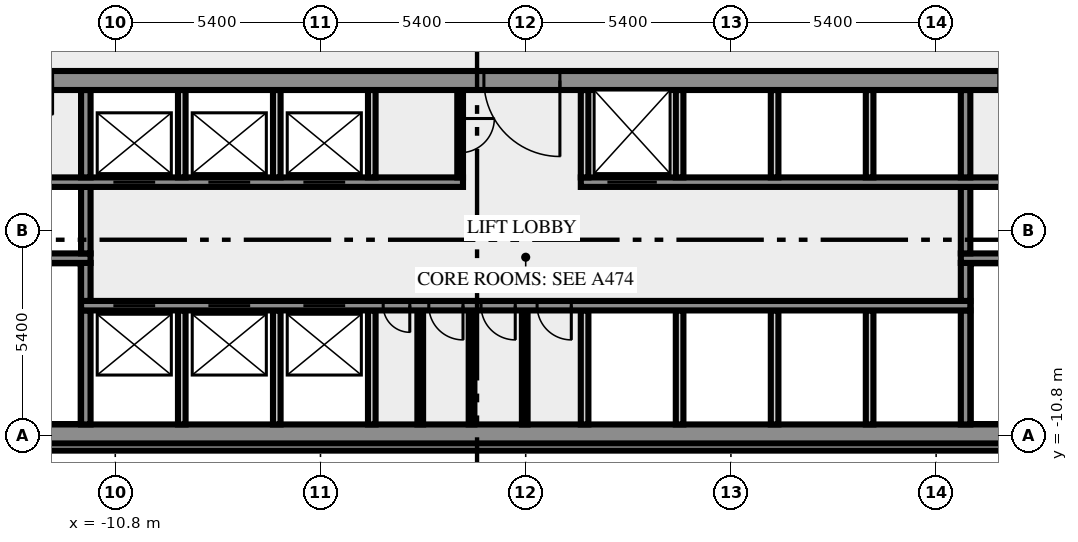
"""IFC4 building model, lengths in metres.
Left out: names, types, materials, properties, quantities, classifications, styles, units other than length and angle.
Written with IfcOpenShell. Run it as: python <this file> out.ifc"""

import sys

from ifc_helpers import new_model, si_unit, direction, frame, frame_2d, origin, place, context, subcontext, project, spatial, rectangle, extrude, element, fill, save


model = new_model("IFC4")
c1 = context("Model", 3, precision=1e-05, world=origin(), true_north=direction((0.0, 1.0)))
c2 = subcontext(c1, "Body", "Model", "MODEL_VIEW")
j1 = project(units=[si_unit("LENGTHUNIT", "METRE"), si_unit("PLANEANGLEUNIT", "RADIAN")], contexts=[c1])
p1 = place(None, origin())
s1 = spatial("IfcSite", under=j1, at=p1, CompositionType="ELEMENT")
p2 = place(p1, origin())
s2 = spatial("IfcBuilding", under=s1, at=p2, CompositionType="ELEMENT")
p3 = place(p2, frame((0.0, 0.0, 125.0)))
s3 = spatial("IfcBuildingStorey", under=s2, at=p3, CompositionType="ELEMENT", Elevation=125.0)
p4 = place(p3, frame((-17.444, -11.088, 0.0), z_axis=(0.0, 0.0, 1.0), x_axis=(1.0, 0.0, 0.0)))
e1 = element("IfcWall", 1, at=p4, inside=s3, PredefinedType="SOLIDWALL", context=c2, shape_type="SweptSolid", body=[
    extrude(rectangle(XDim=34.888, YDim=0.2, at=frame_2d((17.444, 0.0))), origin(), (0.0, 0.0, 1.0), 3.65),
])
p5 = place(p3, frame((-20.0, -10.75, 0.0), z_axis=(0.0, 0.0, 1.0), x_axis=(1.0, 0.0, 0.0)))
e2 = element("IfcWall", 2, at=p5, inside=s3, PredefinedType="SHEAR", context=c2, shape_type="SweptSolid", body=[
    extrude(rectangle(XDim=40.0, YDim=0.5, at=frame_2d((20.0, 0.0))), origin(), (0.0, 0.0, 1.0), 3.65),
])
p6 = place(p5, frame((0.8, 0.0, 1.0)))
e3 = element("IfcOpeningElement", 3, at=p6, cuts=e2, PredefinedType="OPENING", context=c2, shape_type="SweptSolid", body=[
    extrude(rectangle(XDim=1.2, YDim=1.2, at=frame_2d((0.6, 0.6))), frame((0.0, 0.26, 0.0), z_axis=(0.0, -1.0, 0.0), x_axis=(1.0, 0.0, 0.0)), (0.0, 0.0, 1.0), 0.52),
])
p7 = place(p5, frame((38.0, 0.0, 1.0)))
e4 = element("IfcOpeningElement", 4, at=p7, cuts=e2, PredefinedType="OPENING", context=c2, shape_type="SweptSolid", body=[
    extrude(rectangle(XDim=1.2, YDim=1.2, at=frame_2d((0.6, 0.6))), frame((0.0, 0.26, 0.0), z_axis=(0.0, -1.0, 0.0), x_axis=(1.0, 0.0, 0.0)), (0.0, 0.0, 1.0), 0.52),
])
p8 = place(p3, frame((-11.575, -10.5, 0.0), z_axis=(0.0, 0.0, 1.0), x_axis=(0.0, 1.0, 0.0)))
e5 = element("IfcWall", 5, at=p8, inside=s3, PredefinedType="SHEAR", context=c2, shape_type="SweptSolid", body=[
    extrude(rectangle(XDim=3.0, YDim=0.25, at=frame_2d((1.5, 0.0))), origin(), (0.0, 0.0, 1.0), 3.65),
])
for number, where, z_axis, x_axis in (
    (6, (-9.05, -10.5, 0.0), (0.0, 0.0, 1.0), (0.0, 1.0, 0.0)),
    (7, (-6.55, -10.5, 0.0), (0.0, 0.0, 1.0), (0.0, 1.0, 0.0)),
    (8, (-4.05, -10.5, 0.0), (0.0, 0.0, 1.0), (0.0, 1.0, 0.0)),
):
    element("IfcWall", number, at=place(p3, frame(where, z_axis=z_axis, x_axis=x_axis)), inside=s3, PredefinedType="SOLIDWALL", context=c2, shape_type="SweptSolid", body=[
        extrude(rectangle(XDim=3.0, YDim=0.2, at=frame_2d((1.5, 0.0))), origin(), (0.0, 0.0, 1.0), 3.65),
    ])
for number, where, z_axis, x_axis in (
    (9, (-2.775, -10.5, 0.0), (0.0, 0.0, 1.0), (0.0, 1.0, 0.0)),
    (10, (-1.425, -10.5, 0.0), (0.0, 0.0, 1.0), (0.0, 1.0, 0.0)),
    (11, (-0.025, -10.5, 0.0), (0.0, 0.0, 1.0), (0.0, 1.0, 0.0)),
):
    element("IfcWall", number, at=place(p3, frame(where, z_axis=z_axis, x_axis=x_axis)), inside=s3, PredefinedType="PARTITIONING", context=c2, shape_type="SweptSolid", body=[
        extrude(rectangle(XDim=3.0, YDim=0.15, at=frame_2d((1.5, 0.0))), origin(), (0.0, 0.0, 1.0), 3.65),
    ])
for number, where, z_axis, x_axis in (
    (12, (1.55, -10.5, 0.0), (0.0, 0.0, 1.0), (0.0, 1.0, 0.0)),
    (13, (4.05, -10.5, 0.0), (0.0, 0.0, 1.0), (0.0, 1.0, 0.0)),
    (14, (6.55, -10.5, 0.0), (0.0, 0.0, 1.0), (0.0, 1.0, 0.0)),
    (15, (9.05, -10.5, 0.0), (0.0, 0.0, 1.0), (0.0, 1.0, 0.0)),
):
    element("IfcWall", number, at=place(p3, frame(where, z_axis=z_axis, x_axis=x_axis)), inside=s3, PredefinedType="SOLIDWALL", context=c2, shape_type="SweptSolid", body=[
        extrude(rectangle(XDim=3.0, YDim=0.2, at=frame_2d((1.5, 0.0))), origin(), (0.0, 0.0, 1.0), 3.65),
    ])
p9 = place(p3, frame((11.575, -10.5, 0.0), z_axis=(0.0, 0.0, 1.0), x_axis=(0.0, 1.0, 0.0)))
e16 = element("IfcWall", 16, at=p9, inside=s3, PredefinedType="SHEAR", context=c2, shape_type="SweptSolid", body=[
    extrude(rectangle(XDim=3.0, YDim=0.25, at=frame_2d((1.5, 0.0))), origin(), (0.0, 0.0, 1.0), 3.65),
])
p10 = place(p3, frame((11.7, -7.375, 0.0), z_axis=(0.0, 0.0, 1.0), x_axis=(-1.0, 0.0, 0.0)))
e17 = element("IfcWall", 17, at=p10, inside=s3, PredefinedType="SHEAR", context=c2, shape_type="SweptSolid", body=[
    extrude(rectangle(XDim=23.4, YDim=0.25, at=frame_2d((11.7, 0.0))), origin(), (0.0, 0.0, 1.0), 3.65),
])
p11 = place(p10, frame((21.45, 0.0, 0.0)))
e18 = element("IfcOpeningElement", 18, at=p11, cuts=e17, PredefinedType="OPENING", context=c2, shape_type="SweptSolid", body=[
    extrude(rectangle(XDim=1.1, YDim=2.1, at=frame_2d((0.55, 1.05))), frame((0.0, 0.135, 0.0), z_axis=(0.0, -1.0, 0.0), x_axis=(1.0, 0.0, 0.0)), (0.0, 0.0, 1.0), 0.27),
])
p12 = place(p10, frame((18.95, 0.0, 0.0)))
e19 = element("IfcOpeningElement", 19, at=p12, cuts=e17, PredefinedType="OPENING", context=c2, shape_type="SweptSolid", body=[
    extrude(rectangle(XDim=1.1, YDim=2.1, at=frame_2d((0.55, 1.05))), frame((0.0, 0.135, 0.0), z_axis=(0.0, -1.0, 0.0), x_axis=(1.0, 0.0, 0.0)), (0.0, 0.0, 1.0), 0.27),
])
p13 = place(p10, frame((16.45, 0.0, 0.0)))
e20 = element("IfcOpeningElement", 20, at=p13, cuts=e17, PredefinedType="OPENING", context=c2, shape_type="SweptSolid", body=[
    extrude(rectangle(XDim=1.1, YDim=2.1, at=frame_2d((0.55, 1.05))), frame((0.0, 0.135, 0.0), z_axis=(0.0, -1.0, 0.0), x_axis=(1.0, 0.0, 0.0)), (0.0, 0.0, 1.0), 0.27),
])
p14 = place(p10, frame((14.75, 0.0, 0.0)))
e21 = element("IfcOpeningElement", 21, at=p14, cuts=e17, PredefinedType="OPENING", context=c2, shape_type="SweptSolid", body=[
    extrude(rectangle(XDim=0.7, YDim=2.1, at=frame_2d((0.35, 1.05))), frame((0.0, 0.135, 0.0), z_axis=(0.0, -1.0, 0.0), x_axis=(1.0, 0.0, 0.0)), (0.0, 0.0, 1.0), 0.27),
])
p15 = place(p10, frame((13.35, 0.0, 0.0)))
e22 = element("IfcOpeningElement", 22, at=p15, cuts=e17, PredefinedType="OPENING", context=c2, shape_type="SweptSolid", body=[
    extrude(rectangle(XDim=0.9, YDim=2.1, at=frame_2d((0.45, 1.05))), frame((0.0, 0.135, 0.0), z_axis=(0.0, -1.0, 0.0), x_axis=(1.0, 0.0, 0.0)), (0.0, 0.0, 1.0), 0.27),
])
p16 = place(p10, frame((11.975, 0.0, 0.0)))
e23 = element("IfcOpeningElement", 23, at=p16, cuts=e17, PredefinedType="OPENING", context=c2, shape_type="SweptSolid", body=[
    extrude(rectangle(XDim=0.9, YDim=2.1, at=frame_2d((0.45, 1.05))), frame((0.0, 0.135, 0.0), z_axis=(0.0, -1.0, 0.0), x_axis=(1.0, 0.0, 0.0)), (0.0, 0.0, 1.0), 0.27),
])
p17 = place(p10, frame((10.5, 0.0, 0.0)))
e24 = element("IfcOpeningElement", 24, at=p17, cuts=e17, PredefinedType="OPENING", context=c2, shape_type="SweptSolid", body=[
    extrude(rectangle(XDim=0.9, YDim=2.1, at=frame_2d((0.45, 1.05))), frame((0.0, 0.135, 0.0), z_axis=(0.0, -1.0, 0.0), x_axis=(1.0, 0.0, 0.0)), (0.0, 0.0, 1.0), 0.27),
])
for number, where, z_axis, x_axis in (
    (25, (-11.575, -7.25, 0.0), (0.0, 0.0, 1.0), (0.0, 1.0, 0.0)),
    (26, (11.575, -7.25, 0.0), (0.0, 0.0, 1.0), (0.0, 1.0, 0.0)),
):
    element("IfcWall", number, at=place(p3, frame(where, z_axis=z_axis, x_axis=x_axis)), inside=s3, PredefinedType="SHEAR", context=c2, shape_type="SweptSolid", body=[
        extrude(rectangle(XDim=1.0, YDim=0.25, at=frame_2d((0.5, 0.0))), origin(), (0.0, 0.0, 1.0), 3.65),
    ])
p18 = place(p3, frame((-11.45, -6.125, 0.0), z_axis=(0.0, 0.0, 1.0), x_axis=(-1.0, 0.0, 0.0)))
e27 = element("IfcWall", 27, at=p18, inside=s3, PredefinedType="SHEAR", context=c2, shape_type="SweptSolid", body=[
    extrude(rectangle(XDim=8.05, YDim=0.25, at=frame_2d((4.025, 0.0))), origin(), (0.0, 0.0, 1.0), 3.65),
])
p19 = place(p18, frame((6.2, 0.0, 0.0)))
e28 = element("IfcOpeningElement", 28, at=p19, cuts=e27, PredefinedType="OPENING", context=c2, shape_type="SweptSolid", body=[
    extrude(rectangle(XDim=1.8, YDim=2.1, at=frame_2d((0.9, 1.05))), frame((0.0, 0.135, 0.0), z_axis=(0.0, -1.0, 0.0), x_axis=(1.0, 0.0, 0.0)), (0.0, 0.0, 1.0), 0.27),
])
p20 = place(p3, frame((19.5, -6.125, 0.0), z_axis=(0.0, 0.0, 1.0), x_axis=(-1.0, 0.0, 0.0)))
e29 = element("IfcWall", 29, at=p20, inside=s3, PredefinedType="SHEAR", context=c2, shape_type="SweptSolid", body=[
    extrude(rectangle(XDim=8.05, YDim=0.25, at=frame_2d((4.025, 0.0))), origin(), (0.0, 0.0, 1.0), 3.65),
])
p21 = place(p20, frame((0.05, 0.0, 0.0)))
e30 = element("IfcOpeningElement", 30, at=p21, cuts=e29, PredefinedType="OPENING", context=c2, shape_type="SweptSolid", body=[
    extrude(rectangle(XDim=1.8, YDim=2.1, at=frame_2d((0.9, 1.05))), frame((0.0, 0.135, 0.0), z_axis=(0.0, -1.0, 0.0), x_axis=(1.0, 0.0, 0.0)), (0.0, 0.0, 1.0), 0.27),
])
for number, where, z_axis, x_axis in (
    (31, (-11.575, -6.0, 0.0), (0.0, 0.0, 1.0), (0.0, 1.0, 0.0)),
    (32, (11.575, -6.0, 0.0), (0.0, 0.0, 1.0), (0.0, 1.0, 0.0)),
):
    element("IfcWall", number, at=place(p3, frame(where, z_axis=z_axis, x_axis=x_axis)), inside=s3, PredefinedType="SHEAR", context=c2, shape_type="SweptSolid", body=[
        extrude(rectangle(XDim=1.75, YDim=0.25, at=frame_2d((0.875, 0.0))), origin(), (0.0, 0.0, 1.0), 3.65),
    ])
p22 = place(p3, frame((-14.35, -4.125, 0.0), z_axis=(0.0, 0.0, 1.0), x_axis=(1.0, 0.0, 0.0)))
e33 = element("IfcWall", 33, at=p22, inside=s3, PredefinedType="SHEAR", context=c2, shape_type="SweptSolid", body=[
    extrude(rectangle(XDim=12.7, YDim=0.25, at=frame_2d((6.35, 0.0))), origin(), (0.0, 0.0, 1.0), 3.65),
])
p23 = place(p22, frame((3.5, 0.0, 0.0)))
e34 = element("IfcOpeningElement", 34, at=p23, cuts=e33, PredefinedType="OPENING", context=c2, shape_type="SweptSolid", body=[
    extrude(rectangle(XDim=1.1, YDim=2.1, at=frame_2d((0.55, 1.05))), frame((0.0, 0.135, 0.0), z_axis=(0.0, -1.0, 0.0), x_axis=(1.0, 0.0, 0.0)), (0.0, 0.0, 1.0), 0.27),
])
p24 = place(p22, frame((6.0, 0.0, 0.0)))
e35 = element("IfcOpeningElement", 35, at=p24, cuts=e33, PredefinedType="OPENING", context=c2, shape_type="SweptSolid", body=[
    extrude(rectangle(XDim=1.1, YDim=2.1, at=frame_2d((0.55, 1.05))), frame((0.0, 0.135, 0.0), z_axis=(0.0, -1.0, 0.0), x_axis=(1.0, 0.0, 0.0)), (0.0, 0.0, 1.0), 0.27),
])
p25 = place(p22, frame((8.5, 0.0, 0.0)))
e36 = element("IfcOpeningElement", 36, at=p25, cuts=e33, PredefinedType="OPENING", context=c2, shape_type="SweptSolid", body=[
    extrude(rectangle(XDim=1.1, YDim=2.1, at=frame_2d((0.55, 1.05))), frame((0.0, 0.135, 0.0), z_axis=(0.0, -1.0, 0.0), x_axis=(1.0, 0.0, 0.0)), (0.0, 0.0, 1.0), 0.27),
])
p26 = place(p3, frame((1.45, -4.125, 0.0), z_axis=(0.0, 0.0, 1.0), x_axis=(1.0, 0.0, 0.0)))
e37 = element("IfcWall", 37, at=p26, inside=s3, PredefinedType="SHEAR", context=c2, shape_type="SweptSolid", body=[
    extrude(rectangle(XDim=12.9, YDim=0.25, at=frame_2d((6.45, 0.0))), origin(), (0.0, 0.0, 1.0), 3.65),
])
p27 = place(p26, frame((0.7, 0.0, 0.0)))
e38 = element("IfcOpeningElement", 38, at=p27, cuts=e37, PredefinedType="OPENING", context=c2, shape_type="SweptSolid", body=[
    extrude(rectangle(XDim=1.3, YDim=2.1, at=frame_2d((0.65, 1.05))), frame((0.0, 0.135, 0.0), z_axis=(0.0, -1.0, 0.0), x_axis=(1.0, 0.0, 0.0)), (0.0, 0.0, 1.0), 0.27),
])
p28 = place(p3, frame((-11.575, -4.0, 0.0), z_axis=(0.0, 0.0, 1.0), x_axis=(0.0, 1.0, 0.0)))
e39 = element("IfcWall", 39, at=p28, inside=s3, PredefinedType="SHEAR", context=c2, shape_type="SweptSolid", body=[
    extrude(rectangle(XDim=2.3, YDim=0.25, at=frame_2d((1.15, 0.0))), origin(), (0.0, 0.0, 1.0), 3.65),
])
for number, where, z_axis, x_axis in (
    (40, (-9.05, -4.0, 0.0), (0.0, 0.0, 1.0), (0.0, 1.0, 0.0)),
    (41, (-6.55, -4.0, 0.0), (0.0, 0.0, 1.0), (0.0, 1.0, 0.0)),
    (42, (-4.05, -4.0, 0.0), (0.0, 0.0, 1.0), (0.0, 1.0, 0.0)),
):
    element("IfcWall", number, at=place(p3, frame(where, z_axis=z_axis, x_axis=x_axis)), inside=s3, PredefinedType="SOLIDWALL", context=c2, shape_type="SweptSolid", body=[
        extrude(rectangle(XDim=2.3, YDim=0.2, at=frame_2d((1.15, 0.0))), origin(), (0.0, 0.0, 1.0), 3.65),
    ])
p29 = place(p3, frame((-1.725, -1.7, 0.0), z_axis=(0.0, 0.0, 1.0), x_axis=(0.0, -1.0, 0.0)))
e43 = element("IfcWall", 43, at=p29, inside=s3, PredefinedType="PARTITIONING", context=c2, shape_type="SweptSolid", body=[
    extrude(rectangle(XDim=2.3, YDim=0.15, at=frame_2d((1.15, 0.0))), origin(), (0.0, 0.0, 1.0), 3.65),
])
p30 = place(p29, frame((0.75, 0.0, 0.0)))
e44 = element("IfcOpeningElement", 44, at=p30, cuts=e43, PredefinedType="OPENING", context=c2, shape_type="SweptSolid", body=[
    extrude(rectangle(XDim=0.9, YDim=2.1, at=frame_2d((0.45, 1.05))), frame((0.0, 0.085, 0.0), z_axis=(0.0, -1.0, 0.0), x_axis=(1.0, 0.0, 0.0)), (0.0, 0.0, 1.0), 0.17),
])
for number, where, z_axis, x_axis in (
    (45, (1.55, -4.0, 0.0), (0.0, 0.0, 1.0), (0.0, 1.0, 0.0)),
    (46, (4.05, -4.0, 0.0), (0.0, 0.0, 1.0), (0.0, 1.0, 0.0)),
    (47, (6.55, -4.0, 0.0), (0.0, 0.0, 1.0), (0.0, 1.0, 0.0)),
    (48, (9.05, -4.0, 0.0), (0.0, 0.0, 1.0), (0.0, 1.0, 0.0)),
):
    element("IfcWall", number, at=place(p3, frame(where, z_axis=z_axis, x_axis=x_axis)), inside=s3, PredefinedType="SOLIDWALL", context=c2, shape_type="SweptSolid", body=[
        extrude(rectangle(XDim=2.3, YDim=0.2, at=frame_2d((1.15, 0.0))), origin(), (0.0, 0.0, 1.0), 3.65),
    ])
p31 = place(p3, frame((11.575, -4.0, 0.0), z_axis=(0.0, 0.0, 1.0), x_axis=(0.0, 1.0, 0.0)))
e49 = element("IfcWall", 49, at=p31, inside=s3, PredefinedType="SHEAR", context=c2, shape_type="SweptSolid", body=[
    extrude(rectangle(XDim=2.3, YDim=0.25, at=frame_2d((1.15, 0.0))), origin(), (0.0, 0.0, 1.0), 3.65),
])
p32 = place(p3, frame((20.49, -1.45, 0.0), z_axis=(0.0, 0.0, 1.0), x_axis=(-1.0, 0.0, 0.0)))
e50 = element("IfcWall", 50, at=p32, inside=s3, PredefinedType="SHEAR", context=c2, shape_type="SweptSolid", body=[
    extrude(rectangle(XDim=40.98, YDim=0.5, at=frame_2d((20.49, 0.0))), origin(), (0.0, 0.0, 1.0), 3.65),
])
p33 = place(p32, frame((38.14, 0.0, 0.0)))
e51 = element("IfcOpeningElement", 51, at=p33, cuts=e50, PredefinedType="OPENING", context=c2, shape_type="SweptSolid", body=[
    extrude(rectangle(XDim=1.8, YDim=2.1, at=frame_2d((0.9, 1.05))), frame((0.0, 0.26, 0.0), z_axis=(0.0, -1.0, 0.0), x_axis=(1.0, 0.0, 0.0)), (0.0, 0.0, 1.0), 0.52),
])
p34 = place(p32, frame((35.89, 0.0, 0.0)))
e52 = element("IfcOpeningElement", 52, at=p34, cuts=e50, PredefinedType="OPENING", context=c2, shape_type="SweptSolid", body=[
    extrude(rectangle(XDim=0.9, YDim=2.1, at=frame_2d((0.45, 1.05))), frame((0.0, 0.26, 0.0), z_axis=(0.0, -1.0, 0.0), x_axis=(1.0, 0.0, 0.0)), (0.0, 0.0, 1.0), 0.52),
])
p35 = place(p32, frame((32.94, 0.0, 0.0)))
e53 = element("IfcOpeningElement", 53, at=p35, cuts=e50, PredefinedType="OPENING", context=c2, shape_type="SweptSolid", body=[
    extrude(rectangle(XDim=0.9, YDim=2.1, at=frame_2d((0.45, 1.05))), frame((0.0, 0.26, 0.0), z_axis=(0.0, -1.0, 0.0), x_axis=(1.0, 0.0, 0.0)), (0.0, 0.0, 1.0), 0.52),
])
p36 = place(p32, frame((19.59, 0.0, 0.0)))
e54 = element("IfcOpeningElement", 54, at=p36, cuts=e50, PredefinedType="OPENING", context=c2, shape_type="SweptSolid", body=[
    extrude(rectangle(XDim=2.0, YDim=2.1, at=frame_2d((1.0, 1.05))), frame((0.0, 0.26, 0.0), z_axis=(0.0, -1.0, 0.0), x_axis=(1.0, 0.0, 0.0)), (0.0, 0.0, 1.0), 0.52),
])
p37 = place(p32, frame((7.14, 0.0, 0.0)))
e55 = element("IfcOpeningElement", 55, at=p37, cuts=e50, PredefinedType="OPENING", context=c2, shape_type="SweptSolid", body=[
    extrude(rectangle(XDim=0.9, YDim=2.1, at=frame_2d((0.45, 1.05))), frame((0.0, 0.26, 0.0), z_axis=(0.0, -1.0, 0.0), x_axis=(1.0, 0.0, 0.0)), (0.0, 0.0, 1.0), 0.52),
])
p38 = place(p32, frame((5.028, 0.0, 0.0)))
e56 = element("IfcOpeningElement", 56, at=p38, cuts=e50, PredefinedType="OPENING", context=c2, shape_type="SweptSolid", body=[
    extrude(rectangle(XDim=0.8, YDim=2.1, at=frame_2d((0.4, 1.05))), frame((0.0, 0.26, 0.0), z_axis=(0.0, -1.0, 0.0), x_axis=(1.0, 0.0, 0.0)), (0.0, 0.0, 1.0), 0.52),
])
p39 = place(p32, frame((3.452, 0.0, 0.0)))
e57 = element("IfcOpeningElement", 57, at=p39, cuts=e50, PredefinedType="OPENING", context=c2, shape_type="SweptSolid", body=[
    extrude(rectangle(XDim=0.8, YDim=2.1, at=frame_2d((0.4, 1.05))), frame((0.0, 0.26, 0.0), z_axis=(0.0, -1.0, 0.0), x_axis=(1.0, 0.0, 0.0)), (0.0, 0.0, 1.0), 0.52),
])
p40 = place(p32, frame((1.04, 0.0, 0.0)))
e58 = element("IfcOpeningElement", 58, at=p40, cuts=e50, PredefinedType="OPENING", context=c2, shape_type="SweptSolid", body=[
    extrude(rectangle(XDim=1.8, YDim=2.1, at=frame_2d((0.9, 1.05))), frame((0.0, 0.26, 0.0), z_axis=(0.0, -1.0, 0.0), x_axis=(1.0, 0.0, 0.0)), (0.0, 0.0, 1.0), 0.52),
])
p41 = place(p11, origin())
e59 = element("IfcDoor", 59, at=p41, inside=s3, OperationType="DOUBLE_DOOR_SLIDING", PredefinedType="DOOR", context=c2, shape_type="SweptSolid", body=[
    extrude(rectangle(XDim=1.1, YDim=2.1, at=frame_2d((0.55, 1.05))), frame((0.0, 0.025, 0.0), z_axis=(0.0, -1.0, 0.0), x_axis=(1.0, 0.0, 0.0)), (0.0, 0.0, 1.0), 0.05),
])
fill(e18, e59)
p42 = place(p12, origin())
e60 = element("IfcDoor", 60, at=p42, inside=s3, OperationType="DOUBLE_DOOR_SLIDING", PredefinedType="DOOR", context=c2, shape_type="SweptSolid", body=[
    extrude(rectangle(XDim=1.1, YDim=2.1, at=frame_2d((0.55, 1.05))), frame((0.0, 0.025, 0.0), z_axis=(0.0, -1.0, 0.0), x_axis=(1.0, 0.0, 0.0)), (0.0, 0.0, 1.0), 0.05),
])
fill(e19, e60)
p43 = place(p13, origin())
e61 = element("IfcDoor", 61, at=p43, inside=s3, OperationType="DOUBLE_DOOR_SLIDING", PredefinedType="DOOR", context=c2, shape_type="SweptSolid", body=[
    extrude(rectangle(XDim=1.1, YDim=2.1, at=frame_2d((0.55, 1.05))), frame((0.0, 0.025, 0.0), z_axis=(0.0, -1.0, 0.0), x_axis=(1.0, 0.0, 0.0)), (0.0, 0.0, 1.0), 0.05),
])
fill(e20, e61)
p44 = place(p14, origin())
e62 = element("IfcDoor", 62, at=p44, inside=s3, OperationType="SINGLE_SWING_RIGHT", PredefinedType="DOOR", context=c2, shape_type="SweptSolid", body=[
    extrude(rectangle(XDim=0.7, YDim=2.1, at=frame_2d((0.35, 1.05))), frame((0.0, 0.025, 0.0), z_axis=(0.0, -1.0, 0.0), x_axis=(1.0, 0.0, 0.0)), (0.0, 0.0, 1.0), 0.05),
])
fill(e21, e62)
p45 = place(p15, origin())
e63 = element("IfcDoor", 63, at=p45, inside=s3, OperationType="SINGLE_SWING_RIGHT", PredefinedType="DOOR", context=c2, shape_type="SweptSolid", body=[
    extrude(rectangle(XDim=0.9, YDim=2.1, at=frame_2d((0.45, 1.05))), frame((0.0, 0.025, 0.0), z_axis=(0.0, -1.0, 0.0), x_axis=(1.0, 0.0, 0.0)), (0.0, 0.0, 1.0), 0.05),
])
fill(e22, e63)
p46 = place(p16, origin())
e64 = element("IfcDoor", 64, at=p46, inside=s3, OperationType="SINGLE_SWING_RIGHT", PredefinedType="DOOR", context=c2, shape_type="SweptSolid", body=[
    extrude(rectangle(XDim=0.9, YDim=2.1, at=frame_2d((0.45, 1.05))), frame((0.0, 0.025, 0.0), z_axis=(0.0, -1.0, 0.0), x_axis=(1.0, 0.0, 0.0)), (0.0, 0.0, 1.0), 0.05),
])
fill(e23, e64)
p47 = place(p17, origin())
e65 = element("IfcDoor", 65, at=p47, inside=s3, OperationType="SINGLE_SWING_LEFT", PredefinedType="DOOR", context=c2, shape_type="SweptSolid", body=[
    extrude(rectangle(XDim=0.9, YDim=2.1, at=frame_2d((0.45, 1.05))), frame((0.0, 0.025, 0.0), z_axis=(0.0, -1.0, 0.0), x_axis=(1.0, 0.0, 0.0)), (0.0, 0.0, 1.0), 0.05),
])
fill(e24, e65)
p48 = place(p23, origin())
e66 = element("IfcDoor", 66, at=p48, inside=s3, OperationType="DOUBLE_DOOR_SLIDING", PredefinedType="DOOR", context=c2, shape_type="SweptSolid", body=[
    extrude(rectangle(XDim=1.1, YDim=2.1, at=frame_2d((0.55, 1.05))), frame((0.0, 0.025, 0.0), z_axis=(0.0, -1.0, 0.0), x_axis=(1.0, 0.0, 0.0)), (0.0, 0.0, 1.0), 0.05),
])
fill(e34, e66)
p49 = place(p24, origin())
e67 = element("IfcDoor", 67, at=p49, inside=s3, OperationType="DOUBLE_DOOR_SLIDING", PredefinedType="DOOR", context=c2, shape_type="SweptSolid", body=[
    extrude(rectangle(XDim=1.1, YDim=2.1, at=frame_2d((0.55, 1.05))), frame((0.0, 0.025, 0.0), z_axis=(0.0, -1.0, 0.0), x_axis=(1.0, 0.0, 0.0)), (0.0, 0.0, 1.0), 0.05),
])
fill(e35, e67)
p50 = place(p25, origin())
e68 = element("IfcDoor", 68, at=p50, inside=s3, OperationType="DOUBLE_DOOR_SLIDING", PredefinedType="DOOR", context=c2, shape_type="SweptSolid", body=[
    extrude(rectangle(XDim=1.1, YDim=2.1, at=frame_2d((0.55, 1.05))), frame((0.0, 0.025, 0.0), z_axis=(0.0, -1.0, 0.0), x_axis=(1.0, 0.0, 0.0)), (0.0, 0.0, 1.0), 0.05),
])
fill(e36, e68)
p51 = place(p27, origin())
e69 = element("IfcDoor", 69, at=p51, inside=s3, OperationType="DOUBLE_DOOR_SLIDING", PredefinedType="DOOR", context=c2, shape_type="SweptSolid", body=[
    extrude(rectangle(XDim=1.3, YDim=2.1, at=frame_2d((0.65, 1.05))), frame((0.0, 0.025, 0.0), z_axis=(0.0, -1.0, 0.0), x_axis=(1.0, 0.0, 0.0)), (0.0, 0.0, 1.0), 0.05),
])
fill(e38, e69)
p52 = place(p30, origin())
e70 = element("IfcDoor", 70, at=p52, inside=s3, OperationType="SINGLE_SWING_RIGHT", PredefinedType="DOOR", context=c2, shape_type="SweptSolid", body=[
    extrude(rectangle(XDim=0.9, YDim=2.1, at=frame_2d((0.45, 1.05))), frame((0.0, 0.025, 0.0), z_axis=(0.0, -1.0, 0.0), x_axis=(1.0, 0.0, 0.0)), (0.0, 0.0, 1.0), 0.05),
])
fill(e44, e70)
p53 = place(p36, origin())
e71 = element("IfcDoor", 71, at=p53, inside=s3, OperationType="DOUBLE_DOOR_SINGLE_SWING", PredefinedType="DOOR", context=c2, shape_type="SweptSolid", body=[
    extrude(rectangle(XDim=2.0, YDim=2.1, at=frame_2d((1.0, 1.05))), frame((0.0, 0.025, 0.0), z_axis=(0.0, -1.0, 0.0), x_axis=(1.0, 0.0, 0.0)), (0.0, 0.0, 1.0), 0.05),
])
fill(e54, e71)
save(model, sys.argv[1])
